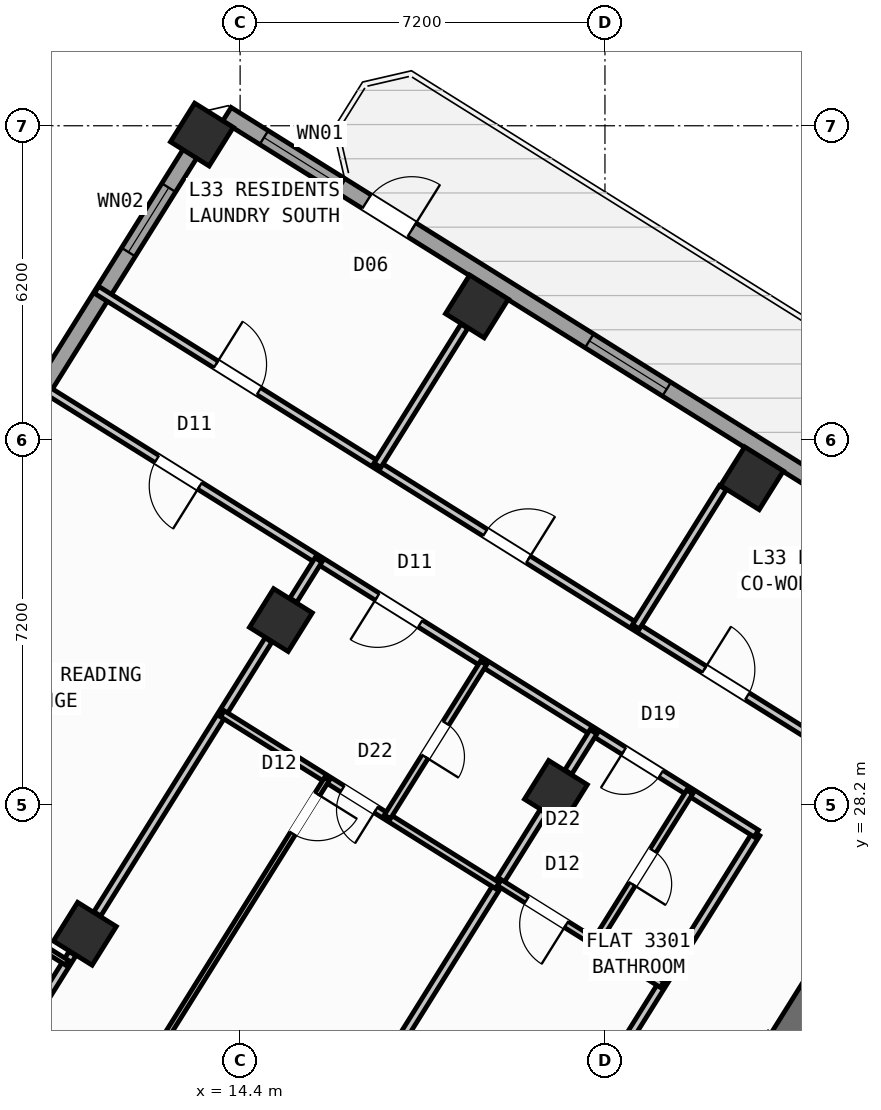
"""IFC4 building model, lengths in metres.
Left out: names, types, materials, properties, quantities, classifications, styles, units other than length and angle.
Written with IfcOpenShell. Run it as: python <this file> out.ifc"""

import sys

from ifc_helpers import new_model, si_unit, direction, frame, frame_2d, origin, origin_2d, place, context, subcontext, project, spatial, rectangle, hollow_rectangle, extrude, source, transform, mapped, element, fill, save


model = new_model("IFC4")
c1 = context("Model", 3, precision=1e-05, world=origin(), true_north=direction((0.0, 1.0)))
c2 = subcontext(c1, "Body", "Model", "MODEL_VIEW")
j1 = project(units=[si_unit("LENGTHUNIT", "METRE"), si_unit("PLANEANGLEUNIT", "RADIAN")], contexts=[c1])
p1 = place(None, origin())
s1 = spatial("IfcSite", under=j1, at=p1, CompositionType="ELEMENT")
p2 = place(p1, origin())
s2 = spatial("IfcBuilding", under=s1, at=p2, CompositionType="ELEMENT")
p3 = place(p2, frame((0.0, 0.0, 132.6)))
s3 = spatial("IfcBuildingStorey", under=s2, at=p3, CompositionType="ELEMENT", Elevation=132.6)
p4 = place(p3, frame((26.007, 24.976, 0.0), z_axis=(0.0, 0.0, 1.0), x_axis=(-0.529923795287, -0.848045264823, 0.0)))
e1 = element("IfcWall", 1, at=p4, inside=s3, PredefinedType="SHEAR", context=c2, shape_type="SweptSolid", body=[
    extrude(rectangle(XDim=6.425, YDim=0.55, at=frame_2d((3.212, 0.0))), origin(), (0.0, 0.0, 1.0), 3.32),
])
m1 = source(origin(), c2, "Body", "SweptSolid", [
    extrude(hollow_rectangle(XDim=0.9, YDim=0.9, WallThickness=0.036, at=origin_2d()), origin(), (0.0, 0.0, 1.0), 3.6),
])
for number, where, z_axis, x_axis in (
    (2, (24.5, 34.643, 0.0), (0.0, 0.0, 1.0), (-0.848, 0.53, 0.0)),
    (3, (20.632, 28.452, 0.0), (0.0, 0.0, 1.0), (-0.848, 0.53, 0.0)),
    (4, (19.073, 38.034, 0.0), (0.0, 0.0, 1.0), (-0.848, 0.53, 0.0)),
    (5, (15.205, 31.844, 0.0), (0.0, 0.0, 1.0), (-0.848, 0.53, 0.0)),
    (6, (11.336, 25.653, 0.0), (0.0, 0.0, 1.0), (-0.848, 0.53, 0.0)),
    (7, (13.646, 41.426, 0.0), (0.0, 0.0, 1.0), (-0.848, 0.53, 0.0)),
):
    element("IfcColumn", number, at=place(p3, frame(where, z_axis=z_axis, x_axis=x_axis)), inside=s3, PredefinedType="COLUMN", context=c2, shape_type="MappedRepresentation", body=[
        mapped(m1, transform((0.0, 0.0, 0.0), scale=1.0)),
    ])
p5 = place(p3, frame((2.415, 23.452, 0.0), z_axis=(0.0, 0.0, 1.0), x_axis=(0.52991049553, 0.848053575387, 0.0)))
e8 = element("IfcWall", 8, at=p5, inside=s3, PredefinedType="STANDARD", context=c2, shape_type="SweptSolid", body=[
    extrude(rectangle(XDim=21.587, YDim=0.32, at=frame_2d((10.794, 0.0))), origin(), (0.0, 0.0, 1.0), 2.745),
])
p6 = place(p5, frame((2.168, 0.0, 0.8)))
e9 = element("IfcOpeningElement", 9, at=p6, cuts=e8, PredefinedType="OPENING", context=c2, shape_type="SweptSolid", body=[
    extrude(rectangle(XDim=2.1, YDim=1.55, at=frame_2d((1.05, 0.775))), frame((0.0, 0.17, 0.0), z_axis=(0.0, -1.0, 0.0), x_axis=(1.0, 0.0, 0.0)), (0.0, 0.0, 1.0), 0.34),
])
p7 = place(p5, frame((9.344, 0.0, 0.85)))
e10 = element("IfcOpeningElement", 10, at=p7, cuts=e8, PredefinedType="OPENING", context=c2, shape_type="SweptSolid", body=[
    extrude(rectangle(XDim=1.8, YDim=1.5, at=frame_2d((0.9, 0.75))), frame((0.0, 0.17, 0.0), z_axis=(0.0, -1.0, 0.0), x_axis=(1.0, 0.0, 0.0)), (0.0, 0.0, 1.0), 0.34),
])
p8 = place(p5, frame((18.459, 0.0, 0.85)))
e11 = element("IfcOpeningElement", 11, at=p8, cuts=e8, PredefinedType="OPENING", context=c2, shape_type="SweptSolid", body=[
    extrude(rectangle(XDim=1.5, YDim=1.5, at=frame_2d((0.75, 0.75))), frame((0.0, 0.17, 0.0), z_axis=(0.0, -1.0, 0.0), x_axis=(1.0, 0.0, 0.0)), (0.0, 0.0, 1.0), 0.34),
])
p9 = place(p3, frame((14.138, 41.825, 0.0), z_axis=(0.0, 0.0, 1.0), x_axis=(0.848046498049, -0.529921821731, 0.0)))
e12 = element("IfcWall", 12, at=p9, inside=s3, PredefinedType="STANDARD", context=c2, shape_type="SweptSolid", body=[
    extrude(rectangle(XDim=31.588, YDim=0.32, at=frame_2d((15.794, 0.0))), origin(), (0.0, 0.0, 1.0), 3.32),
])
p10 = place(p9, frame((3.253, 0.0, 0.0)))
e13 = element("IfcOpeningElement", 13, at=p10, cuts=e12, PredefinedType="OPENING", context=c2, shape_type="SweptSolid", body=[
    extrude(rectangle(XDim=1.05, YDim=2.15, at=frame_2d((0.525, 1.075))), frame((0.0, 0.17, 0.0), z_axis=(0.0, -1.0, 0.0), x_axis=(1.0, 0.0, 0.0)), (0.0, 0.0, 1.0), 0.34),
])
p11 = place(p9, frame((0.863, 0.0, 0.85)))
e14 = element("IfcOpeningElement", 14, at=p11, cuts=e12, PredefinedType="OPENING", context=c2, shape_type="SweptSolid", body=[
    extrude(rectangle(XDim=1.8, YDim=1.5, at=frame_2d((0.9, 0.75))), frame((0.0, 0.17, 0.0), z_axis=(0.0, -1.0, 0.0), x_axis=(1.0, 0.0, 0.0)), (0.0, 0.0, 1.0), 0.34),
])
p12 = place(p9, frame((8.435, 0.0, 0.85)))
e15 = element("IfcOpeningElement", 15, at=p12, cuts=e12, PredefinedType="OPENING", context=c2, shape_type="SweptSolid", body=[
    extrude(rectangle(XDim=1.8, YDim=1.5, at=frame_2d((0.9, 0.75))), frame((0.0, 0.17, 0.0), z_axis=(0.0, -1.0, 0.0), x_axis=(1.0, 0.0, 0.0)), (0.0, 0.0, 1.0), 0.34),
])
p13 = place(p9, frame((13.874, 0.0, 0.85)))
e16 = element("IfcOpeningElement", 16, at=p13, cuts=e12, PredefinedType="OPENING", context=c2, shape_type="SweptSolid", body=[
    extrude(rectangle(XDim=1.5, YDim=1.5, at=frame_2d((0.75, 0.75))), frame((0.0, 0.17, 0.0), z_axis=(0.0, -1.0, 0.0), x_axis=(1.0, 0.0, 0.0)), (0.0, 0.0, 1.0), 0.34),
])
p14 = place(p9, frame((17.104, 0.0, 1.0)))
e17 = element("IfcOpeningElement", 17, at=p14, cuts=e12, PredefinedType="OPENING", context=c2, shape_type="SweptSolid", body=[
    extrude(rectangle(XDim=0.9, YDim=1.25, at=frame_2d((0.45, 0.625))), frame((0.0, 0.17, 0.0), z_axis=(0.0, -1.0, 0.0), x_axis=(1.0, 0.0, 0.0)), (0.0, 0.0, 1.0), 0.34),
])
p15 = place(p9, frame((22.131, 0.0, 1.0)))
e18 = element("IfcOpeningElement", 18, at=p15, cuts=e12, PredefinedType="OPENING", context=c2, shape_type="SweptSolid", body=[
    extrude(rectangle(XDim=0.9, YDim=1.25, at=frame_2d((0.45, 0.625))), frame((0.0, 0.17, 0.0), z_axis=(0.0, -1.0, 0.0), x_axis=(1.0, 0.0, 0.0)), (0.0, 0.0, 1.0), 0.34),
])
p16 = place(p9, frame((27.706, 0.0, 1.0)))
e19 = element("IfcOpeningElement", 19, at=p16, cuts=e12, PredefinedType="OPENING", context=c2, shape_type="SweptSolid", body=[
    extrude(rectangle(XDim=0.9, YDim=1.25, at=frame_2d((0.45, 0.625))), frame((0.0, 0.17, 0.0), z_axis=(0.0, -1.0, 0.0), x_axis=(1.0, 0.0, 0.0)), (0.0, 0.0, 1.0), 0.34),
])
p17 = place(p3, frame((24.588, 27.631, 0.0), z_axis=(0.0, 0.0, 1.0), x_axis=(-0.529914586043, -0.848051019396, 0.0)))
e20 = element("IfcWall", 20, at=p17, inside=s3, PredefinedType="PARTITIONING", context=c2, shape_type="SweptSolid", body=[
    extrude(rectangle(XDim=15.35, YDim=0.16, at=frame_2d((7.675, 0.0))), origin(), (0.0, 0.0, 1.0), 3.31),
])
p18 = place(p3, frame((25.754, 29.497, 0.0), z_axis=(0.0, 0.0, 1.0), x_axis=(-0.848045850158, 0.529922858565, 0.0)))
e21 = element("IfcWall", 21, at=p18, inside=s3, PredefinedType="PARTITIONING", context=c2, shape_type="SweptSolid", body=[
    extrude(rectangle(XDim=16.73, YDim=0.16, at=frame_2d((8.365, 0.0))), origin(), (0.0, 0.0, 1.0), 3.31),
])
p19 = place(p18, frame((1.588, 0.0, 0.0)))
e22 = element("IfcOpeningElement", 22, at=p19, cuts=e21, PredefinedType="OPENING", context=c2, shape_type="SweptSolid", body=[
    extrude(rectangle(XDim=1.0, YDim=2.1, at=frame_2d((0.5, 1.05))), frame((0.0, 0.09, 0.0), z_axis=(0.0, -1.0, 0.0), x_axis=(1.0, 0.0, 0.0)), (0.0, 0.0, 1.0), 0.18),
])
p20 = place(p18, frame((6.685, 0.0, 0.0)))
e23 = element("IfcOpeningElement", 23, at=p20, cuts=e21, PredefinedType="OPENING", context=c2, shape_type="SweptSolid", body=[
    extrude(rectangle(XDim=1.0, YDim=2.1, at=frame_2d((0.5, 1.05))), frame((0.0, 0.09, 0.0), z_axis=(0.0, -1.0, 0.0), x_axis=(1.0, 0.0, 0.0)), (0.0, 0.0, 1.0), 0.18),
])
p21 = place(p18, frame((12.951, 0.0, 0.0)))
e24 = element("IfcOpeningElement", 24, at=p21, cuts=e21, PredefinedType="OPENING", context=c2, shape_type="SweptSolid", body=[
    extrude(rectangle(XDim=1.0, YDim=2.1, at=frame_2d((0.5, 1.05))), frame((0.0, 0.09, 0.0), z_axis=(0.0, -1.0, 0.0), x_axis=(1.0, 0.0, 0.0)), (0.0, 0.0, 1.0), 0.18),
])
p22 = place(p3, frame((24.588, 27.631, 0.0), z_axis=(0.0, 0.0, 1.0), x_axis=(-0.848041752158, 0.529929416617, 0.0)))
e25 = element("IfcWall", 25, at=p22, inside=s3, PredefinedType="PARTITIONING", context=c2, shape_type="SweptSolid", body=[
    extrude(rectangle(XDim=16.73, YDim=0.16, at=frame_2d((8.365, 0.0))), origin(), (0.0, 0.0, 1.0), 3.31),
])
p23 = place(p22, frame((2.22, 0.0, 0.0)))
e26 = element("IfcOpeningElement", 26, at=p23, cuts=e25, PredefinedType="OPENING", context=c2, shape_type="SweptSolid", body=[
    extrude(rectangle(XDim=0.86, YDim=2.05, at=frame_2d((0.43, 1.025))), frame((0.0, 0.09, 0.0), z_axis=(0.0, -1.0, 0.0), x_axis=(1.0, 0.0, 0.0)), (0.0, 0.0, 1.0), 0.18),
])
p24 = place(p22, frame((7.82, 0.0, 0.0)))
e27 = element("IfcOpeningElement", 27, at=p24, cuts=e25, PredefinedType="OPENING", context=c2, shape_type="SweptSolid", body=[
    extrude(rectangle(XDim=1.0, YDim=2.1, at=frame_2d((0.5, 1.05))), frame((0.0, 0.09, 0.0), z_axis=(0.0, -1.0, 0.0), x_axis=(1.0, 0.0, 0.0)), (0.0, 0.0, 1.0), 0.18),
])
p25 = place(p22, frame((12.95, 0.0, 0.0)))
e28 = element("IfcOpeningElement", 28, at=p25, cuts=e25, PredefinedType="OPENING", context=c2, shape_type="SweptSolid", body=[
    extrude(rectangle(XDim=1.0, YDim=2.1, at=frame_2d((0.5, 1.05))), frame((0.0, 0.09, 0.0), z_axis=(0.0, -1.0, 0.0), x_axis=(1.0, 0.0, 0.0)), (0.0, 0.0, 1.0), 0.18),
])
p26 = place(p3, frame((21.374, 29.639, 0.0), z_axis=(0.0, 0.0, 1.0), x_axis=(-0.529952145338, -0.848027548876, 0.0)))
e29 = element("IfcWall", 29, at=p26, inside=s3, PredefinedType="PARTITIONING", context=c2, shape_type="SweptSolid", body=[
    extrude(rectangle(XDim=0.938, YDim=0.16, at=frame_2d((0.469, 0.0))), origin(), (0.0, 0.0, 1.0), 2.745),
])
p27 = place(p3, frame((20.387, 28.06, 0.0), z_axis=(0.0, 0.0, 1.0), x_axis=(-0.529902564924, -0.848058530814, 0.0)))
e30 = element("IfcWall", 30, at=p27, inside=s3, PredefinedType="PARTITIONING", context=c2, shape_type="SweptSolid", body=[
    extrude(rectangle(XDim=6.376, YDim=0.16, at=frame_2d((3.188, 0.0))), origin(), (0.0, 0.0, 1.0), 2.745),
])
p28 = place(p3, frame((22.728, 24.654, 0.0), z_axis=(0.0, 0.0, 1.0), x_axis=(-0.848059820872, 0.529900500304, 0.0)))
e31 = element("IfcWall", 31, at=p28, inside=s3, PredefinedType="PLUMBINGWALL", context=c2, shape_type="SweptSolid", body=[
    extrude(rectangle(XDim=3.79, YDim=0.14, at=frame_2d((1.895, 0.0))), origin(), (0.0, 0.0, 1.0), 3.31),
])
p29 = place(p28, frame((2.23, 0.0, 0.0)))
e32 = element("IfcOpeningElement", 32, at=p29, cuts=e31, PredefinedType="OPENING", context=c2, shape_type="SweptSolid", body=[
    extrude(rectangle(XDim=0.92, YDim=2.08, at=frame_2d((0.46, 1.04))), frame((0.0, 0.08, 0.0), z_axis=(0.0, -1.0, 0.0), x_axis=(1.0, 0.0, 0.0)), (0.0, 0.0, 1.0), 0.16),
])
p30 = place(p3, frame((23.273, 28.452, 0.0), z_axis=(0.0, 0.0, 1.0), x_axis=(-0.529867639402, -0.848080352747, 0.0)))
e33 = element("IfcWall", 33, at=p30, inside=s3, PredefinedType="PLUMBINGWALL", context=c2, shape_type="SweptSolid", body=[
    extrude(rectangle(XDim=3.51, YDim=0.14, at=frame_2d((1.755, 0.0))), origin(), (0.0, 0.0, 1.0), 2.935),
])
p31 = place(p30, frame((1.365, 0.0, 0.0)))
e34 = element("IfcOpeningElement", 34, at=p31, cuts=e33, PredefinedType="OPENING", context=c2, shape_type="SweptSolid", body=[
    extrude(rectangle(XDim=0.78, YDim=2.05, at=frame_2d((0.39, 1.025))), frame((0.0, 0.08, 0.0), z_axis=(0.0, -1.0, 0.0), x_axis=(1.0, 0.0, 0.0)), (0.0, 0.0, 1.0), 0.16),
])
p32 = place(p3, frame((15.946, 33.031, 0.0), z_axis=(0.0, 0.0, 1.0), x_axis=(-0.529952145338, -0.848027548876, 0.0)))
e35 = element("IfcWall", 35, at=p32, inside=s3, PredefinedType="PARTITIONING", context=c2, shape_type="SweptSolid", body=[
    extrude(rectangle(XDim=0.938, YDim=0.16, at=frame_2d((0.469, 0.0))), origin(), (0.0, 0.0, 1.0), 2.745),
])
p33 = place(p3, frame((14.96, 31.452, 0.0), z_axis=(0.0, 0.0, 1.0), x_axis=(-0.529947310719, -0.848030570122, 0.0)))
e36 = element("IfcWall", 36, at=p33, inside=s3, PredefinedType="PARTITIONING", context=c2, shape_type="SweptSolid", body=[
    extrude(rectangle(XDim=6.376, YDim=0.16, at=frame_2d((3.188, 0.0))), origin(), (0.0, 0.0, 1.0), 2.745),
])
p34 = place(p3, frame((11.091, 25.261, 0.0), z_axis=(0.0, 0.0, 1.0), x_axis=(-0.52994257524, -0.848033529377, 0.0)))
e37 = element("IfcWall", 37, at=p34, inside=s3, PredefinedType="PARTITIONING", context=c2, shape_type="SweptSolid", body=[
    extrude(rectangle(XDim=5.451, YDim=0.16, at=frame_2d((2.726, 0.0))), origin(), (0.0, 0.0, 1.0), 2.745),
])
p35 = place(p3, frame((19.477, 26.603, 0.0), z_axis=(0.0, 0.0, 1.0), x_axis=(-0.848039019877, 0.529933789039, 0.0)))
e38 = element("IfcWall", 38, at=p35, inside=s3, PredefinedType="PLUMBINGWALL", context=c2, shape_type="SweptSolid", body=[
    extrude(rectangle(XDim=6.4, YDim=0.14, at=frame_2d((3.2, 0.0))), origin(), (0.0, 0.0, 1.0), 3.31),
])
p36 = place(p35, frame((2.824, 0.0, 0.0)))
e39 = element("IfcOpeningElement", 39, at=p36, cuts=e38, PredefinedType="OPENING", context=c2, shape_type="SweptSolid", body=[
    extrude(rectangle(XDim=0.78, YDim=2.05, at=frame_2d((0.39, 1.025))), frame((0.0, 0.08, 0.0), z_axis=(0.0, -1.0, 0.0), x_axis=(1.0, 0.0, 0.0)), (0.0, 0.0, 1.0), 0.16),
])
p37 = place(p3, frame((19.203, 30.996, 0.0), z_axis=(0.0, 0.0, 1.0), x_axis=(-0.529906983049, -0.848055770169, 0.0)))
e40 = element("IfcWall", 40, at=p37, inside=s3, PredefinedType="PLUMBINGWALL", context=c2, shape_type="SweptSolid", body=[
    extrude(rectangle(XDim=3.58, YDim=0.14, at=frame_2d((1.79, 0.0))), origin(), (0.0, 0.0, 1.0), 3.31),
])
p38 = place(p37, frame((1.4, 0.0, 0.0)))
e41 = element("IfcOpeningElement", 41, at=p38, cuts=e40, PredefinedType="OPENING", context=c2, shape_type="SweptSolid", body=[
    extrude(rectangle(XDim=0.78, YDim=2.05, at=frame_2d((0.39, 1.025))), frame((0.0, 0.08, 0.0), z_axis=(0.0, -1.0, 0.0), x_axis=(1.0, 0.0, 0.0)), (0.0, 0.0, 1.0), 0.16),
])
p39 = place(p3, frame((16.112, 28.706, 0.0), z_axis=(0.0, 0.0, 1.0), x_axis=(-0.529929676091, -0.848041590017, 0.0)))
e42 = element("IfcWall", 42, at=p39, inside=s3, PredefinedType="PARTITIONING", context=c2, shape_type="SweptSolid", body=[
    extrude(rectangle(XDim=12.04, YDim=0.11, at=frame_2d((6.02, 0.0))), origin(), (0.0, 0.0, 1.0), 3.31),
])
p40 = place(p39, frame((0.35, 0.0, 0.0)))
e43 = element("IfcOpeningElement", 43, at=p40, cuts=e42, PredefinedType="OPENING", context=c2, shape_type="SweptSolid", body=[
    extrude(rectangle(XDim=0.92, YDim=2.08, at=frame_2d((0.46, 1.04))), frame((0.0, 0.065, 0.0), z_axis=(0.0, -1.0, 0.0), x_axis=(1.0, 0.0, 0.0)), (0.0, 0.0, 1.0), 0.13),
])
p41 = place(p3, frame((10.98, 25.083, 0.0), z_axis=(0.0, 0.0, 1.0), x_axis=(-0.848048787466, 0.529918157905, 0.0)))
e44 = element("IfcWall", 44, at=p41, inside=s3, PredefinedType="PARTITIONING", context=c2, shape_type="SweptSolid", body=[
    extrude(rectangle(XDim=6.52, YDim=0.11, at=frame_2d((3.26, 0.0))), origin(), (0.0, 0.0, 1.0), 3.31),
])
p42 = place(p41, frame((2.8, 0.0, 0.0)))
e45 = element("IfcOpeningElement", 45, at=p42, cuts=e44, PredefinedType="OPENING", context=c2, shape_type="SweptSolid", body=[
    extrude(rectangle(XDim=0.92, YDim=2.08, at=frame_2d((0.46, 1.04))), frame((0.0, 0.065, 0.0), z_axis=(0.0, -1.0, 0.0), x_axis=(1.0, 0.0, 0.0)), (0.0, 0.0, 1.0), 0.13),
])
p43 = place(p3, frame((23.927, 34.456, 0.0), z_axis=(0.0, 0.0, 1.0), x_axis=(-0.529978607573, -0.848011011435, 0.0)))
e46 = element("IfcWall", 46, at=p43, inside=s3, PredefinedType="PARTITIONING", context=c2, shape_type="SweptSolid", body=[
    extrude(rectangle(XDim=3.238, YDim=0.16, at=frame_2d((1.619, 0.0))), origin(), (0.0, 0.0, 1.0), 3.31),
])
p44 = place(p3, frame((18.825, 37.644, 0.0), z_axis=(0.0, 0.0, 1.0), x_axis=(-0.529924383291, -0.848044897393, 0.0)))
e47 = element("IfcWall", 47, at=p44, inside=s3, PredefinedType="PARTITIONING", context=c2, shape_type="SweptSolid", body=[
    extrude(rectangle(XDim=3.238, YDim=0.16, at=frame_2d((1.619, 0.0))), origin(), (0.0, 0.0, 1.0), 2.745),
])
m2 = source(origin(), c2, "Body", "SweptSolid", [
    extrude(rectangle(XDim=1.05, YDim=2.15, at=frame_2d((0.525, 1.075))), frame((0.0, 0.025, 0.0), z_axis=(0.0, -1.0, 0.0), x_axis=(1.0, 0.0, 0.0)), (0.0, 0.0, 1.0), 0.05),
])
p45 = place(p10, origin())
e48 = element("IfcDoor", 48, at=p45, inside=s3, OperationType="SINGLE_SWING_RIGHT", PredefinedType="DOOR", context=c2, shape_type="MappedRepresentation", body=[
    mapped(m2, transform((0.0, 0.0, 0.0), scale=1.0)),
])
fill(e13, e48)
m3 = source(origin(), c2, "Body", "SweptSolid", [
    extrude(rectangle(XDim=1.5, YDim=1.5, at=frame_2d((0.75, 0.75))), frame((0.0, 0.03, 0.0), z_axis=(0.0, -1.0, 0.0), x_axis=(1.0, 0.0, 0.0)), (0.0, 0.0, 1.0), 0.06),
])
p46 = place(p8, origin())
e49 = element("IfcWindow", 49, at=p46, inside=s3, PartitioningType="SINGLE_PANEL", PredefinedType="WINDOW", context=c2, shape_type="MappedRepresentation", body=[
    mapped(m3, transform((0.0, 0.0, 0.0), scale=1.0)),
])
fill(e11, e49)
m4 = source(origin(), c2, "Body", "SweptSolid", [
    extrude(rectangle(XDim=1.8, YDim=1.5, at=frame_2d((0.9, 0.75))), frame((0.0, 0.03, 0.0), z_axis=(0.0, -1.0, 0.0), x_axis=(1.0, 0.0, 0.0)), (0.0, 0.0, 1.0), 0.06),
])
p47 = place(p11, origin())
e50 = element("IfcWindow", 50, at=p47, inside=s3, PartitioningType="SINGLE_PANEL", PredefinedType="WINDOW", context=c2, shape_type="MappedRepresentation", body=[
    mapped(m4, transform((0.0, 0.0, 0.0), scale=1.0)),
])
fill(e14, e50)
p48 = place(p12, origin())
e51 = element("IfcWindow", 51, at=p48, inside=s3, PartitioningType="SINGLE_PANEL", PredefinedType="WINDOW", context=c2, shape_type="MappedRepresentation", body=[
    mapped(m4, transform((0.0, 0.0, 0.0), scale=1.0)),
])
fill(e15, e51)
m5 = source(origin(), c2, "Body", "SweptSolid", [
    extrude(rectangle(XDim=0.86, YDim=2.05, at=frame_2d((0.43, 1.025))), frame((0.0, 0.025, 0.0), z_axis=(0.0, -1.0, 0.0), x_axis=(1.0, 0.0, 0.0)), (0.0, 0.0, 1.0), 0.05),
])
p49 = place(p23, origin())
e52 = element("IfcDoor", 52, at=p49, inside=s3, OperationType="SINGLE_SWING_RIGHT", PredefinedType="DOOR", context=c2, shape_type="MappedRepresentation", body=[
    mapped(m5, transform((0.0, 0.0, 0.0), scale=1.0)),
])
fill(e26, e52)
m6 = source(origin(), c2, "Body", "SweptSolid", [
    extrude(rectangle(XDim=0.92, YDim=2.08, at=frame_2d((0.46, 1.04))), frame((0.0, 0.025, 0.0), z_axis=(0.0, -1.0, 0.0), x_axis=(1.0, 0.0, 0.0)), (0.0, 0.0, 1.0), 0.05),
])
p50 = place(p29, origin())
e53 = element("IfcDoor", 53, at=p50, inside=s3, OperationType="SINGLE_SWING_LEFT", PredefinedType="DOOR", context=c2, shape_type="MappedRepresentation", body=[
    mapped(m6, transform((0.0, 0.0, 0.0), scale=1.0)),
])
fill(e32, e53)
m7 = source(origin(), c2, "Body", "SweptSolid", [
    extrude(rectangle(XDim=0.78, YDim=2.05, at=frame_2d((0.39, 1.025))), frame((0.0, 0.025, 0.0), z_axis=(0.0, -1.0, 0.0), x_axis=(1.0, 0.0, 0.0)), (0.0, 0.0, 1.0), 0.05),
])
p51 = place(p31, origin())
e54 = element("IfcDoor", 54, at=p51, inside=s3, OperationType="SINGLE_SWING_RIGHT", PredefinedType="DOOR", context=c2, shape_type="MappedRepresentation", body=[
    mapped(m7, transform((0.0, 0.0, 0.0), scale=1.0)),
])
fill(e34, e54)
p52 = place(p40, origin())
e55 = element("IfcDoor", 55, at=p52, inside=s3, OperationType="SINGLE_SWING_LEFT", PredefinedType="DOOR", context=c2, shape_type="MappedRepresentation", body=[
    mapped(m6, transform((0.0, 0.0, 0.0), scale=1.0)),
])
fill(e43, e55)
m8 = source(origin(), c2, "Body", "SweptSolid", [
    extrude(rectangle(XDim=1.0, YDim=2.1, at=frame_2d((0.5, 1.05))), frame((0.0, 0.025, 0.0), z_axis=(0.0, -1.0, 0.0), x_axis=(1.0, 0.0, 0.0)), (0.0, 0.0, 1.0), 0.05),
])
p53 = place(p24, origin())
e56 = element("IfcDoor", 56, at=p53, inside=s3, OperationType="SINGLE_SWING_RIGHT", PredefinedType="DOOR", context=c2, shape_type="MappedRepresentation", body=[
    mapped(m8, transform((0.0, 0.0, 0.0), scale=1.0)),
])
fill(e27, e56)
p54 = place(p36, origin())
e57 = element("IfcDoor", 57, at=p54, inside=s3, OperationType="SINGLE_SWING_LEFT", PredefinedType="DOOR", context=c2, shape_type="MappedRepresentation", body=[
    mapped(m7, transform((0.0, 0.0, 0.0), scale=1.0)),
])
fill(e39, e57)
p55 = place(p38, origin())
e58 = element("IfcDoor", 58, at=p55, inside=s3, OperationType="SINGLE_SWING_RIGHT", PredefinedType="DOOR", context=c2, shape_type="MappedRepresentation", body=[
    mapped(m7, transform((0.0, 0.0, 0.0), scale=1.0)),
])
fill(e41, e58)
p56 = place(p25, origin())
e59 = element("IfcDoor", 59, at=p56, inside=s3, OperationType="SINGLE_SWING_LEFT", PredefinedType="DOOR", context=c2, shape_type="MappedRepresentation", body=[
    mapped(m8, transform((0.0, 0.0, 0.0), scale=1.0)),
])
fill(e28, e59)
p57 = place(p19, frame((1.0, 0.0, 0.0), z_axis=(0.0, 0.0, 1.0), x_axis=(-1.0, 0.0, 0.0)))
e60 = element("IfcDoor", 60, at=p57, inside=s3, OperationType="SINGLE_SWING_LEFT", PredefinedType="DOOR", context=c2, shape_type="MappedRepresentation", body=[
    mapped(m8, transform((0.0, 0.0, 0.0), scale=1.0)),
])
fill(e22, e60)
p58 = place(p20, frame((1.0, 0.0, 0.0), z_axis=(0.0, 0.0, 1.0), x_axis=(-1.0, 0.0, 0.0)))
e61 = element("IfcDoor", 61, at=p58, inside=s3, OperationType="SINGLE_SWING_RIGHT", PredefinedType="DOOR", context=c2, shape_type="MappedRepresentation", body=[
    mapped(m8, transform((0.0, 0.0, 0.0), scale=1.0)),
])
fill(e23, e61)
p59 = place(p21, frame((1.0, 0.0, 0.0), z_axis=(0.0, 0.0, 1.0), x_axis=(-1.0, 0.0, 0.0)))
e62 = element("IfcDoor", 62, at=p59, inside=s3, OperationType="SINGLE_SWING_LEFT", PredefinedType="DOOR", context=c2, shape_type="MappedRepresentation", body=[
    mapped(m8, transform((0.0, 0.0, 0.0), scale=1.0)),
])
fill(e24, e62)
save(model, sys.argv[1])
